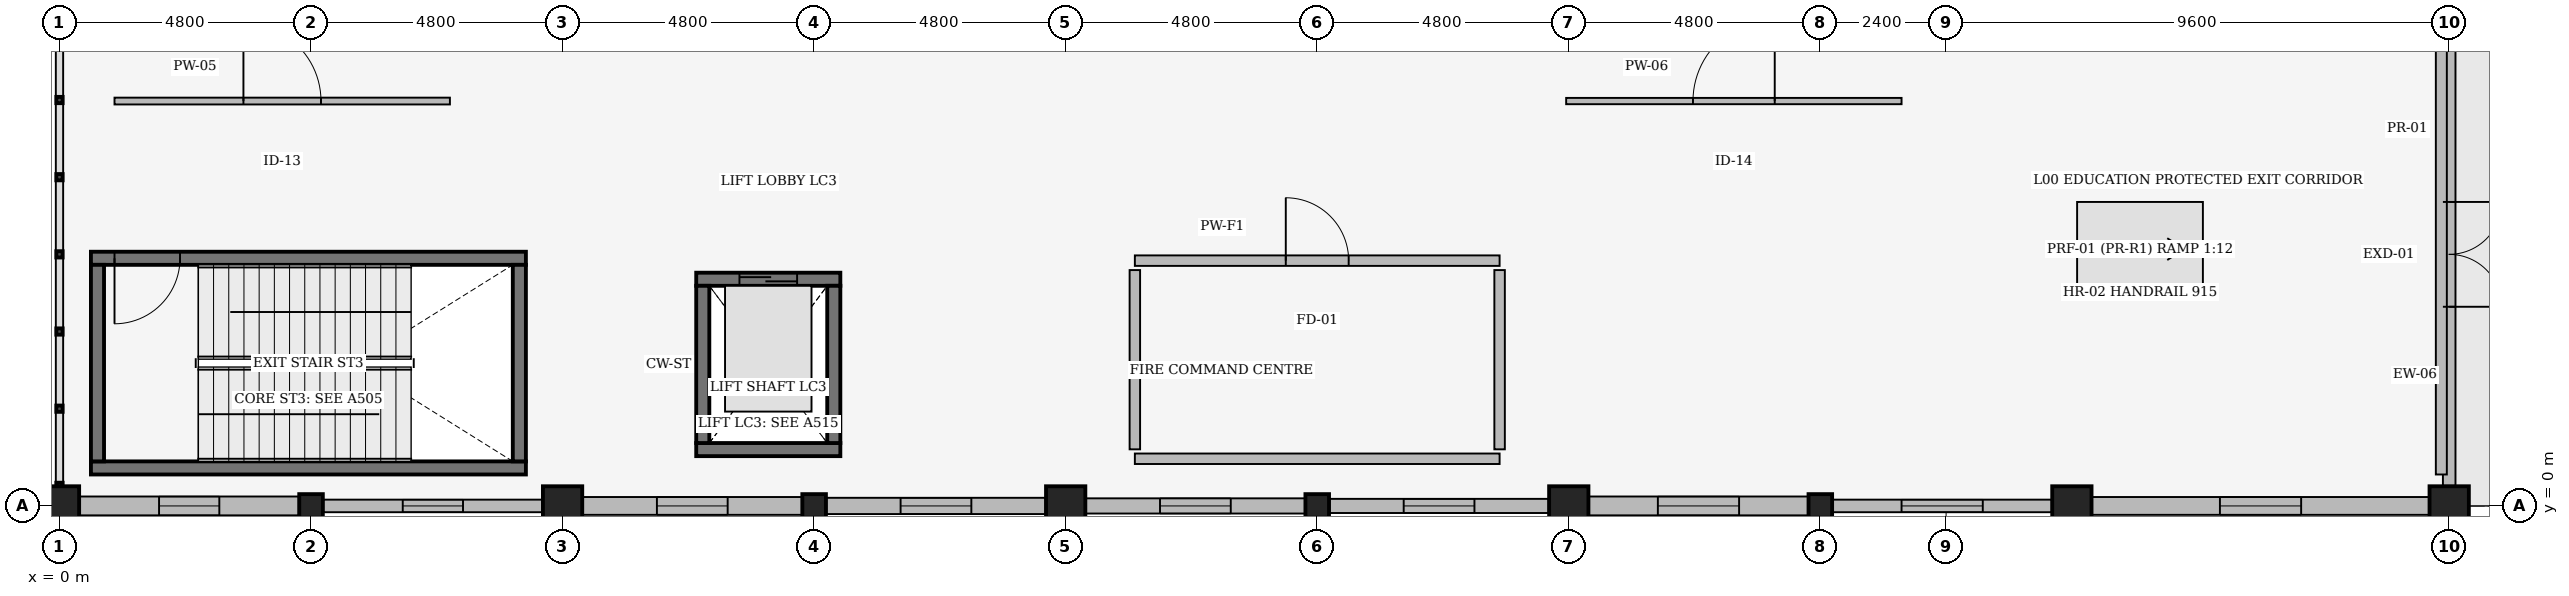
"""IFC4 building model, lengths in metres.
Left out: names, types, materials, properties, quantities, classifications, styles, units other than length and angle.
Written with IfcOpenShell. Run it as: python <this file> out.ifc"""

import sys

from ifc_helpers import new_model, si_unit, direction, frame, frame_2d, origin, origin_2d, place, context, subcontext, project, spatial, rectangle, extrude, element, fill, save


model = new_model("IFC4")
c1 = context("Model", 3, precision=1e-05, world=origin(), true_north=direction((0.0, 1.0)))
c2 = subcontext(c1, "Body", "Model", "MODEL_VIEW")
j1 = project(units=[si_unit("LENGTHUNIT", "METRE"), si_unit("PLANEANGLEUNIT", "RADIAN")], contexts=[c1])
p1 = place(None, origin())
s1 = spatial("IfcSite", under=j1, at=p1, CompositionType="ELEMENT")
p2 = place(p1, origin())
s2 = spatial("IfcBuilding", under=s1, at=p2, CompositionType="ELEMENT")
p3 = place(p2, origin())
s3 = spatial("IfcBuildingStorey", under=s2, at=p3, CompositionType="ELEMENT", Elevation=0.0)
for number, where, z_axis, x_axis in (
    (1, (0.0, 0.0, 0.0), (0.0, 0.0, 1.0), (1.0, 0.0, 0.0)),
    (2, (9.6, 0.0, 0.0), (0.0, 0.0, 1.0), (1.0, 0.0, 0.0)),
    (3, (19.2, 0.0, 0.0), (0.0, 0.0, 1.0), (1.0, 0.0, 0.0)),
    (4, (28.8, 0.0, 0.0), (0.0, 0.0, 1.0), (1.0, 0.0, 0.0)),
    (5, (38.4, 0.0, 0.0), (0.0, 0.0, 1.0), (1.0, 0.0, 0.0)),
    (6, (45.6, 0.0, 0.0), (0.0, 0.0, 1.0), (1.0, 0.0, 0.0)),
):
    element("IfcColumn", number, at=place(p3, frame(where, z_axis=z_axis, x_axis=x_axis)), inside=s3, PredefinedType="COLUMN", context=c2, shape_type="SweptSolid", body=[
        extrude(rectangle(XDim=0.75, YDim=0.75, at=origin_2d()), origin(), (0.0, 0.0, 1.0), 5.4),
    ])
for number, where, z_axis, x_axis in (
    (7, (4.8, 0.0, 0.0), (0.0, 0.0, 1.0), (1.0, 0.0, 0.0)),
    (8, (14.4, 0.0, 0.0), (0.0, 0.0, 1.0), (1.0, 0.0, 0.0)),
    (9, (24.0, 0.0, 0.0), (0.0, 0.0, 1.0), (1.0, 0.0, 0.0)),
    (10, (33.6, 0.0, 0.0), (0.0, 0.0, 1.0), (1.0, 0.0, 0.0)),
):
    element("IfcColumn", number, at=place(p3, frame(where, z_axis=z_axis, x_axis=x_axis)), inside=s3, PredefinedType="PILASTER", context=c2, shape_type="SweptSolid", body=[
        extrude(rectangle(XDim=0.45, YDim=0.45, at=origin_2d()), origin(), (0.0, 0.0, 1.0), 5.1),
    ])
p4 = place(p3, frame((45.6, 0.383, 0.0), z_axis=(0.0, 0.0, 1.0), x_axis=(0.0, 1.0, 0.0)))
e11 = element("IfcWall", 11, at=p4, inside=s3, PredefinedType="SOLIDWALL", context=c2, shape_type="SweptSolid", body=[
    extrude(rectangle(XDim=8.834, YDim=0.24, at=frame_2d((4.417, 0.0))), origin(), (0.0, 0.0, 1.0), 4.778),
])
p5 = place(p4, frame((5.417, 0.0, 0.0), z_axis=(0.0, 0.0, 1.0), x_axis=(-1.0, 0.0, 0.0)))
e12 = element("IfcOpeningElement", 12, at=p5, cuts=e11, PredefinedType="OPENING", context=c2, shape_type="SweptSolid", body=[
    extrude(rectangle(XDim=2.0, YDim=2.5, at=frame_2d((1.0, 1.25))), frame((0.0, 0.13, 0.0), z_axis=(0.0, -1.0, 0.0), x_axis=(1.0, 0.0, 0.0)), (0.0, 0.0, 1.0), 0.26),
])
p6 = place(p3, frame((0.383, 0.0, 0.0), z_axis=(0.0, 0.0, 1.0), x_axis=(1.0, 0.0, 0.0)))
e13 = element("IfcWall", 13, at=p6, inside=s3, PredefinedType="SOLIDWALL", context=c2, shape_type="SweptSolid", body=[
    extrude(rectangle(XDim=4.184, YDim=0.36, at=frame_2d((2.092, 0.0))), origin(), (0.0, 0.0, 1.0), 4.863),
])
p7 = place(p6, frame((1.517, 0.0, 0.95)))
e14 = element("IfcOpeningElement", 14, at=p7, cuts=e13, PredefinedType="OPENING", context=c2, shape_type="SweptSolid", body=[
    extrude(rectangle(XDim=1.15, YDim=1.8, at=frame_2d((0.575, 0.9))), frame((0.0, 0.19, 0.0), z_axis=(0.0, -1.0, 0.0), x_axis=(1.0, 0.0, 0.0)), (0.0, 0.0, 1.0), 0.38),
])
p8 = place(p3, frame((5.033, 0.0, 0.0), z_axis=(0.0, 0.0, 1.0), x_axis=(1.0, 0.0, 0.0)))
e15 = element("IfcWall", 15, at=p8, inside=s3, PredefinedType="SOLIDWALL", context=c2, shape_type="SweptSolid", body=[
    extrude(rectangle(XDim=4.184, YDim=0.24, at=frame_2d((2.092, 0.0))), origin(), (0.0, 0.0, 1.0), 4.863),
])
p9 = place(p8, frame((1.517, 0.0, 0.95)))
e16 = element("IfcOpeningElement", 16, at=p9, cuts=e15, PredefinedType="OPENING", context=c2, shape_type="SweptSolid", body=[
    extrude(rectangle(XDim=1.15, YDim=2.1, at=frame_2d((0.575, 1.05))), frame((0.0, 0.13, 0.0), z_axis=(0.0, -1.0, 0.0), x_axis=(1.0, 0.0, 0.0)), (0.0, 0.0, 1.0), 0.26),
])
p10 = place(p3, frame((9.983, 0.0, 0.0), z_axis=(0.0, 0.0, 1.0), x_axis=(1.0, 0.0, 0.0)))
e17 = element("IfcWall", 17, at=p10, inside=s3, PredefinedType="SOLIDWALL", context=c2, shape_type="SweptSolid", body=[
    extrude(rectangle(XDim=4.184, YDim=0.34, at=frame_2d((2.092, 0.0))), origin(), (0.0, 0.0, 1.0), 4.758),
])
p11 = place(p10, frame((1.417, 0.0, 0.95)))
e18 = element("IfcOpeningElement", 18, at=p11, cuts=e17, PredefinedType="OPENING", context=c2, shape_type="SweptSolid", body=[
    extrude(rectangle(XDim=1.35, YDim=1.2, at=frame_2d((0.675, 0.6))), frame((0.0, 0.18, 0.0), z_axis=(0.0, -1.0, 0.0), x_axis=(1.0, 0.0, 0.0)), (0.0, 0.0, 1.0), 0.36),
])
p12 = place(p3, frame((14.633, 0.0, 0.0), z_axis=(0.0, 0.0, 1.0), x_axis=(1.0, 0.0, 0.0)))
e19 = element("IfcWall", 19, at=p12, inside=s3, PredefinedType="SOLIDWALL", context=c2, shape_type="SweptSolid", body=[
    extrude(rectangle(XDim=4.184, YDim=0.31, at=frame_2d((2.092, 0.0))), origin(), (0.0, 0.0, 1.0), 4.758),
])
p13 = place(p12, frame((1.417, 0.0, 0.95)))
e20 = element("IfcOpeningElement", 20, at=p13, cuts=e19, PredefinedType="OPENING", context=c2, shape_type="SweptSolid", body=[
    extrude(rectangle(XDim=1.35, YDim=1.5, at=frame_2d((0.675, 0.75))), frame((0.0, 0.165, 0.0), z_axis=(0.0, -1.0, 0.0), x_axis=(1.0, 0.0, 0.0)), (0.0, 0.0, 1.0), 0.33),
])
p14 = place(p3, frame((19.583, 0.0, 0.0), z_axis=(0.0, 0.0, 1.0), x_axis=(1.0, 0.0, 0.0)))
e21 = element("IfcWall", 21, at=p14, inside=s3, PredefinedType="SOLIDWALL", context=c2, shape_type="SweptSolid", body=[
    extrude(rectangle(XDim=4.184, YDim=0.29, at=frame_2d((2.092, 0.0))), origin(), (0.0, 0.0, 1.0), 4.863),
])
p15 = place(p14, frame((1.417, 0.0, 0.95)))
e22 = element("IfcOpeningElement", 22, at=p15, cuts=e21, PredefinedType="OPENING", context=c2, shape_type="SweptSolid", body=[
    extrude(rectangle(XDim=1.35, YDim=1.8, at=frame_2d((0.675, 0.9))), frame((0.0, 0.155, 0.0), z_axis=(0.0, -1.0, 0.0), x_axis=(1.0, 0.0, 0.0)), (0.0, 0.0, 1.0), 0.31),
])
p16 = place(p3, frame((24.233, 0.0, 0.0), z_axis=(0.0, 0.0, 1.0), x_axis=(1.0, 0.0, 0.0)))
e23 = element("IfcWall", 23, at=p16, inside=s3, PredefinedType="SOLIDWALL", context=c2, shape_type="SweptSolid", body=[
    extrude(rectangle(XDim=4.184, YDim=0.27, at=frame_2d((2.092, 0.0))), origin(), (0.0, 0.0, 1.0), 4.863),
])
p17 = place(p16, frame((1.417, 0.0, 0.95)))
e24 = element("IfcOpeningElement", 24, at=p17, cuts=e23, PredefinedType="OPENING", context=c2, shape_type="SweptSolid", body=[
    extrude(rectangle(XDim=1.35, YDim=2.1, at=frame_2d((0.675, 1.05))), frame((0.0, 0.145, 0.0), z_axis=(0.0, -1.0, 0.0), x_axis=(1.0, 0.0, 0.0)), (0.0, 0.0, 1.0), 0.29),
])
p18 = place(p3, frame((29.183, 0.0, 0.0), z_axis=(0.0, 0.0, 1.0), x_axis=(1.0, 0.0, 0.0)))
e25 = element("IfcWall", 25, at=p18, inside=s3, PredefinedType="SOLIDWALL", context=c2, shape_type="SweptSolid", body=[
    extrude(rectangle(XDim=4.184, YDim=0.36, at=frame_2d((2.092, 0.0))), origin(), (0.0, 0.0, 1.0), 4.758),
])
p19 = place(p18, frame((1.317, 0.0, 0.95)))
e26 = element("IfcOpeningElement", 26, at=p19, cuts=e25, PredefinedType="OPENING", context=c2, shape_type="SweptSolid", body=[
    extrude(rectangle(XDim=1.55, YDim=1.2, at=frame_2d((0.775, 0.6))), frame((0.0, 0.19, 0.0), z_axis=(0.0, -1.0, 0.0), x_axis=(1.0, 0.0, 0.0)), (0.0, 0.0, 1.0), 0.38),
])
p20 = place(p3, frame((33.833, 0.0, 0.0), z_axis=(0.0, 0.0, 1.0), x_axis=(1.0, 0.0, 0.0)))
e27 = element("IfcWall", 27, at=p20, inside=s3, PredefinedType="SOLIDWALL", context=c2, shape_type="SweptSolid", body=[
    extrude(rectangle(XDim=4.184, YDim=0.24, at=frame_2d((2.092, 0.0))), origin(), (0.0, 0.0, 1.0), 4.758),
])
p21 = place(p20, frame((1.317, 0.0, 0.95)))
e28 = element("IfcOpeningElement", 28, at=p21, cuts=e27, PredefinedType="OPENING", context=c2, shape_type="SweptSolid", body=[
    extrude(rectangle(XDim=1.55, YDim=1.5, at=frame_2d((0.775, 0.75))), frame((0.0, 0.13, 0.0), z_axis=(0.0, -1.0, 0.0), x_axis=(1.0, 0.0, 0.0)), (0.0, 0.0, 1.0), 0.26),
])
p22 = place(p3, frame((38.783, 0.0, 0.0), z_axis=(0.0, 0.0, 1.0), x_axis=(1.0, 0.0, 0.0)))
e29 = element("IfcWall", 29, at=p22, inside=s3, PredefinedType="SOLIDWALL", context=c2, shape_type="SweptSolid", body=[
    extrude(rectangle(XDim=6.434, YDim=0.34, at=frame_2d((3.217, 0.0))), origin(), (0.0, 0.0, 1.0), 4.883),
])
p23 = place(p22, frame((2.442, 0.0, 0.95)))
e30 = element("IfcOpeningElement", 30, at=p23, cuts=e29, PredefinedType="OPENING", context=c2, shape_type="SweptSolid", body=[
    extrude(rectangle(XDim=1.55, YDim=1.8, at=frame_2d((0.775, 0.9))), frame((0.0, 0.18, 0.0), z_axis=(0.0, -1.0, 0.0), x_axis=(1.0, 0.0, 0.0)), (0.0, 0.0, 1.0), 0.36),
])
p24 = place(p3, frame((45.45, 0.6, 5.4), z_axis=(0.0, 0.0, 1.0), x_axis=(0.0, 1.0, 0.0)))
e31 = element("IfcWall", 31, at=p24, inside=s3, PredefinedType="PARAPET", context=c2, shape_type="SweptSolid", body=[
    extrude(rectangle(XDim=13.2, YDim=0.21, at=frame_2d((6.6, 0.0))), origin(), (0.0, 0.0, 1.0), 0.55),
])
p25 = place(p3, frame((0.6, 0.725, 0.0), z_axis=(0.0, 0.0, 1.0), x_axis=(1.0, 0.0, 0.0)))
e32 = element("IfcWall", 32, at=p25, inside=s3, PredefinedType="SHEAR", context=c2, shape_type="SweptSolid", body=[
    extrude(rectangle(XDim=8.3, YDim=0.25, at=frame_2d((4.15, 0.0))), origin(), (0.0, 0.0, 1.0), 5.1),
])
p26 = place(p3, frame((8.9, 4.725, 0.0), z_axis=(0.0, 0.0, 1.0), x_axis=(-1.0, 0.0, 0.0)))
e33 = element("IfcWall", 33, at=p26, inside=s3, PredefinedType="SHEAR", context=c2, shape_type="SweptSolid", body=[
    extrude(rectangle(XDim=8.3, YDim=0.25, at=frame_2d((4.15, 0.0))), origin(), (0.0, 0.0, 1.0), 5.1),
])
p27 = place(p26, frame((7.85, 0.0, 0.0), z_axis=(0.0, 0.0, 1.0), x_axis=(-1.0, 0.0, 0.0)))
e34 = element("IfcOpeningElement", 34, at=p27, cuts=e33, PredefinedType="OPENING", context=c2, shape_type="SweptSolid", body=[
    extrude(rectangle(XDim=1.25, YDim=2.2, at=frame_2d((0.625, 1.1))), frame((0.0, 0.135, 0.0), z_axis=(0.0, -1.0, 0.0), x_axis=(1.0, 0.0, 0.0)), (0.0, 0.0, 1.0), 0.27),
])
for number, where, z_axis, x_axis in (
    (35, (0.725, 4.6, 0.0), (0.0, 0.0, 1.0), (0.0, -1.0, 0.0)),
    (36, (8.775, 0.85, 0.0), (0.0, 0.0, 1.0), (0.0, 1.0, 0.0)),
):
    element("IfcWall", number, at=place(p3, frame(where, z_axis=z_axis, x_axis=x_axis)), inside=s3, PredefinedType="SHEAR", context=c2, shape_type="SweptSolid", body=[
        extrude(rectangle(XDim=3.75, YDim=0.25, at=frame_2d((1.875, 0.0))), origin(), (0.0, 0.0, 1.0), 5.1),
    ])
p28 = place(p3, frame((12.15, 1.075, 0.0), z_axis=(0.0, 0.0, 1.0), x_axis=(1.0, 0.0, 0.0)))
e37 = element("IfcWall", 37, at=p28, inside=s3, PredefinedType="SHEAR", context=c2, shape_type="SweptSolid", body=[
    extrude(rectangle(XDim=2.75, YDim=0.25, at=frame_2d((1.375, 0.0))), origin(), (0.0, 0.0, 1.0), 5.1),
])
p29 = place(p3, frame((12.15, 4.325, 0.0), z_axis=(0.0, 0.0, 1.0), x_axis=(1.0, 0.0, 0.0)))
e38 = element("IfcWall", 38, at=p29, inside=s3, PredefinedType="SHEAR", context=c2, shape_type="SweptSolid", body=[
    extrude(rectangle(XDim=2.75, YDim=0.25, at=frame_2d((1.375, 0.0))), origin(), (0.0, 0.0, 1.0), 5.1),
])
p30 = place(p29, frame((0.825, 0.0, 0.0)))
e39 = element("IfcOpeningElement", 39, at=p30, cuts=e38, PredefinedType="OPENING", context=c2, shape_type="SweptSolid", body=[
    extrude(rectangle(XDim=1.1, YDim=2.2, at=frame_2d((0.55, 1.1))), frame((0.0, 0.135, 0.0), z_axis=(0.0, -1.0, 0.0), x_axis=(1.0, 0.0, 0.0)), (0.0, 0.0, 1.0), 0.27),
])
for number, where, z_axis, x_axis in (
    (40, (12.275, 1.2, 0.0), (0.0, 0.0, 1.0), (0.0, 1.0, 0.0)),
    (41, (14.775, 1.2, 0.0), (0.0, 0.0, 1.0), (0.0, 1.0, 0.0)),
):
    element("IfcWall", number, at=place(p3, frame(where, z_axis=z_axis, x_axis=x_axis)), inside=s3, PredefinedType="SHEAR", context=c2, shape_type="SweptSolid", body=[
        extrude(rectangle(XDim=3.0, YDim=0.25, at=frame_2d((1.5, 0.0))), origin(), (0.0, 0.0, 1.0), 5.1),
    ])
p31 = place(p3, frame((20.52, 4.68, 0.0), z_axis=(0.0, 0.0, 1.0), x_axis=(1.0, 0.0, 0.0)))
e42 = element("IfcWall", 42, at=p31, inside=s3, PredefinedType="PARTITIONING", context=c2, shape_type="SweptSolid", body=[
    extrude(rectangle(XDim=6.96, YDim=0.2, at=frame_2d((3.48, 0.0))), origin(), (0.0, 0.0, 1.0), 4.814),
])
p32 = place(p31, frame((2.88, 0.0, 0.0)))
e43 = element("IfcOpeningElement", 43, at=p32, cuts=e42, PredefinedType="OPENING", context=c2, shape_type="SweptSolid", body=[
    extrude(rectangle(XDim=1.2, YDim=2.2, at=frame_2d((0.6, 1.1))), frame((0.0, 0.11, 0.0), z_axis=(0.0, -1.0, 0.0), x_axis=(1.0, 0.0, 0.0)), (0.0, 0.0, 1.0), 0.22),
])
p33 = place(p3, frame((20.52, 0.9, 0.0), z_axis=(0.0, 0.0, 1.0), x_axis=(1.0, 0.0, 0.0)))
e44 = element("IfcWall", 44, at=p33, inside=s3, PredefinedType="PARTITIONING", context=c2, shape_type="SweptSolid", body=[
    extrude(rectangle(XDim=6.96, YDim=0.2, at=frame_2d((3.48, 0.0))), origin(), (0.0, 0.0, 1.0), 5.04),
])
for number, where, z_axis, x_axis in (
    (45, (20.52, 1.08, 0.0), (0.0, 0.0, 1.0), (0.0, 1.0, 0.0)),
    (46, (27.48, 1.08, 0.0), (0.0, 0.0, 1.0), (0.0, 1.0, 0.0)),
):
    element("IfcWall", number, at=place(p3, frame(where, z_axis=z_axis, x_axis=x_axis)), inside=s3, PredefinedType="PARTITIONING", context=c2, shape_type="SweptSolid", body=[
        extrude(rectangle(XDim=3.42, YDim=0.2, at=frame_2d((1.71, 0.0))), origin(), (0.0, 0.0, 1.0), 4.756),
    ])
p34 = place(p3, frame((1.05, 7.725, 0.0), z_axis=(0.0, 0.0, 1.0), x_axis=(1.0, 0.0, 0.0)))
e47 = element("IfcWall", 47, at=p34, inside=s3, PredefinedType="PARTITIONING", context=c2, shape_type="SweptSolid", body=[
    extrude(rectangle(XDim=6.4, YDim=0.13, at=frame_2d((3.2, 0.0))), origin(), (0.0, 0.0, 1.0), 5.04),
])
p35 = place(p34, frame((2.46, 0.0, 0.0)))
e48 = element("IfcOpeningElement", 48, at=p35, cuts=e47, PredefinedType="OPENING", context=c2, shape_type="SweptSolid", body=[
    extrude(rectangle(XDim=1.48, YDim=2.3, at=frame_2d((0.74, 1.15))), frame((0.0, 0.075, 0.0), z_axis=(0.0, -1.0, 0.0), x_axis=(1.0, 0.0, 0.0)), (0.0, 0.0, 1.0), 0.15),
])
p36 = place(p3, frame((28.75, 7.725, 0.0), z_axis=(0.0, 0.0, 1.0), x_axis=(1.0, 0.0, 0.0)))
e49 = element("IfcWall", 49, at=p36, inside=s3, PredefinedType="PARTITIONING", context=c2, shape_type="SweptSolid", body=[
    extrude(rectangle(XDim=6.4, YDim=0.12, at=frame_2d((3.2, 0.0))), origin(), (0.0, 0.0, 1.0), 4.597),
])
p37 = place(p36, frame((2.42, 0.0, 0.0)))
e50 = element("IfcOpeningElement", 50, at=p37, cuts=e49, PredefinedType="OPENING", context=c2, shape_type="SweptSolid", body=[
    extrude(rectangle(XDim=1.56, YDim=2.32, at=frame_2d((0.78, 1.16))), frame((0.0, 0.07, 0.0), z_axis=(0.0, -1.0, 0.0), x_axis=(1.0, 0.0, 0.0)), (0.0, 0.0, 1.0), 0.14),
])
p38 = place(p5, origin())
e51 = element("IfcDoor", 51, at=p38, inside=s3, OperationType="DOUBLE_DOOR_SINGLE_SWING", PredefinedType="DOOR", context=c2, shape_type="SweptSolid", body=[
    extrude(rectangle(XDim=2.0, YDim=2.5, at=frame_2d((1.0, 1.25))), frame((0.0, 0.025, 0.0), z_axis=(0.0, -1.0, 0.0), x_axis=(1.0, 0.0, 0.0)), (0.0, 0.0, 1.0), 0.05),
])
fill(e12, e51)
p39 = place(p7, origin())
e52 = element("IfcWindow", 52, at=p39, inside=s3, PartitioningType="SINGLE_PANEL", PredefinedType="WINDOW", context=c2, shape_type="SweptSolid", body=[
    extrude(rectangle(XDim=1.15, YDim=1.8, at=frame_2d((0.575, 0.9))), frame((0.0, 0.03, 0.0), z_axis=(0.0, -1.0, 0.0), x_axis=(1.0, 0.0, 0.0)), (0.0, 0.0, 1.0), 0.06),
])
fill(e14, e52)
p40 = place(p9, origin())
e53 = element("IfcWindow", 53, at=p40, inside=s3, PartitioningType="SINGLE_PANEL", PredefinedType="WINDOW", context=c2, shape_type="SweptSolid", body=[
    extrude(rectangle(XDim=1.15, YDim=2.1, at=frame_2d((0.575, 1.05))), frame((0.0, 0.03, 0.0), z_axis=(0.0, -1.0, 0.0), x_axis=(1.0, 0.0, 0.0)), (0.0, 0.0, 1.0), 0.06),
])
fill(e16, e53)
p41 = place(p11, origin())
e54 = element("IfcWindow", 54, at=p41, inside=s3, PartitioningType="SINGLE_PANEL", PredefinedType="WINDOW", context=c2, shape_type="SweptSolid", body=[
    extrude(rectangle(XDim=1.35, YDim=1.2, at=frame_2d((0.675, 0.6))), frame((0.0, 0.03, 0.0), z_axis=(0.0, -1.0, 0.0), x_axis=(1.0, 0.0, 0.0)), (0.0, 0.0, 1.0), 0.06),
])
fill(e18, e54)
p42 = place(p13, origin())
e55 = element("IfcWindow", 55, at=p42, inside=s3, PartitioningType="SINGLE_PANEL", PredefinedType="WINDOW", context=c2, shape_type="SweptSolid", body=[
    extrude(rectangle(XDim=1.35, YDim=1.5, at=frame_2d((0.675, 0.75))), frame((0.0, 0.03, 0.0), z_axis=(0.0, -1.0, 0.0), x_axis=(1.0, 0.0, 0.0)), (0.0, 0.0, 1.0), 0.06),
])
fill(e20, e55)
p43 = place(p15, origin())
e56 = element("IfcWindow", 56, at=p43, inside=s3, PartitioningType="SINGLE_PANEL", PredefinedType="WINDOW", context=c2, shape_type="SweptSolid", body=[
    extrude(rectangle(XDim=1.35, YDim=1.8, at=frame_2d((0.675, 0.9))), frame((0.0, 0.03, 0.0), z_axis=(0.0, -1.0, 0.0), x_axis=(1.0, 0.0, 0.0)), (0.0, 0.0, 1.0), 0.06),
])
fill(e22, e56)
p44 = place(p17, origin())
e57 = element("IfcWindow", 57, at=p44, inside=s3, PartitioningType="SINGLE_PANEL", PredefinedType="WINDOW", context=c2, shape_type="SweptSolid", body=[
    extrude(rectangle(XDim=1.35, YDim=2.1, at=frame_2d((0.675, 1.05))), frame((0.0, 0.03, 0.0), z_axis=(0.0, -1.0, 0.0), x_axis=(1.0, 0.0, 0.0)), (0.0, 0.0, 1.0), 0.06),
])
fill(e24, e57)
p45 = place(p19, origin())
e58 = element("IfcWindow", 58, at=p45, inside=s3, PartitioningType="SINGLE_PANEL", PredefinedType="WINDOW", context=c2, shape_type="SweptSolid", body=[
    extrude(rectangle(XDim=1.55, YDim=1.2, at=frame_2d((0.775, 0.6))), frame((0.0, 0.03, 0.0), z_axis=(0.0, -1.0, 0.0), x_axis=(1.0, 0.0, 0.0)), (0.0, 0.0, 1.0), 0.06),
])
fill(e26, e58)
p46 = place(p21, origin())
e59 = element("IfcWindow", 59, at=p46, inside=s3, PartitioningType="SINGLE_PANEL", PredefinedType="WINDOW", context=c2, shape_type="SweptSolid", body=[
    extrude(rectangle(XDim=1.55, YDim=1.5, at=frame_2d((0.775, 0.75))), frame((0.0, 0.03, 0.0), z_axis=(0.0, -1.0, 0.0), x_axis=(1.0, 0.0, 0.0)), (0.0, 0.0, 1.0), 0.06),
])
fill(e28, e59)
p47 = place(p23, origin())
e60 = element("IfcWindow", 60, at=p47, inside=s3, PartitioningType="SINGLE_PANEL", PredefinedType="WINDOW", context=c2, shape_type="SweptSolid", body=[
    extrude(rectangle(XDim=1.55, YDim=1.8, at=frame_2d((0.775, 0.9))), frame((0.0, 0.03, 0.0), z_axis=(0.0, -1.0, 0.0), x_axis=(1.0, 0.0, 0.0)), (0.0, 0.0, 1.0), 0.06),
])
fill(e30, e60)
p48 = place(p27, origin())
e61 = element("IfcDoor", 61, at=p48, inside=s3, OperationType="SINGLE_SWING_LEFT", PredefinedType="DOOR", context=c2, shape_type="SweptSolid", body=[
    extrude(rectangle(XDim=1.25, YDim=2.2, at=frame_2d((0.625, 1.1))), frame((0.0, 0.025, 0.0), z_axis=(0.0, -1.0, 0.0), x_axis=(1.0, 0.0, 0.0)), (0.0, 0.0, 1.0), 0.05),
])
fill(e34, e61)
p49 = place(p30, origin())
e62 = element("IfcDoor", 62, at=p49, inside=s3, OperationType="DOUBLE_DOOR_SLIDING", PredefinedType="DOOR", context=c2, shape_type="SweptSolid", body=[
    extrude(rectangle(XDim=1.1, YDim=2.2, at=frame_2d((0.55, 1.1))), frame((0.0, 0.025, 0.0), z_axis=(0.0, -1.0, 0.0), x_axis=(1.0, 0.0, 0.0)), (0.0, 0.0, 1.0), 0.05),
])
fill(e39, e62)
p50 = place(p32, origin())
e63 = element("IfcDoor", 63, at=p50, inside=s3, OperationType="SINGLE_SWING_LEFT", PredefinedType="DOOR", context=c2, shape_type="SweptSolid", body=[
    extrude(rectangle(XDim=1.2, YDim=2.2, at=frame_2d((0.6, 1.1))), frame((0.0, 0.025, 0.0), z_axis=(0.0, -1.0, 0.0), x_axis=(1.0, 0.0, 0.0)), (0.0, 0.0, 1.0), 0.05),
])
fill(e43, e63)
p51 = place(p35, origin())
e64 = element("IfcDoor", 64, at=p51, inside=s3, OperationType="SINGLE_SWING_LEFT", PredefinedType="DOOR", context=c2, shape_type="SweptSolid", body=[
    extrude(rectangle(XDim=1.48, YDim=2.3, at=frame_2d((0.74, 1.15))), frame((0.0, 0.025, 0.0), z_axis=(0.0, -1.0, 0.0), x_axis=(1.0, 0.0, 0.0)), (0.0, 0.0, 1.0), 0.05),
])
fill(e48, e64)
p52 = place(p37, origin())
e65 = element("IfcDoor", 65, at=p52, inside=s3, OperationType="SINGLE_SWING_RIGHT", PredefinedType="DOOR", context=c2, shape_type="SweptSolid", body=[
    extrude(rectangle(XDim=1.56, YDim=2.32, at=frame_2d((0.78, 1.16))), frame((0.0, 0.025, 0.0), z_axis=(0.0, -1.0, 0.0), x_axis=(1.0, 0.0, 0.0)), (0.0, 0.0, 1.0), 0.05),
])
fill(e50, e65)
save(model, sys.argv[1])
